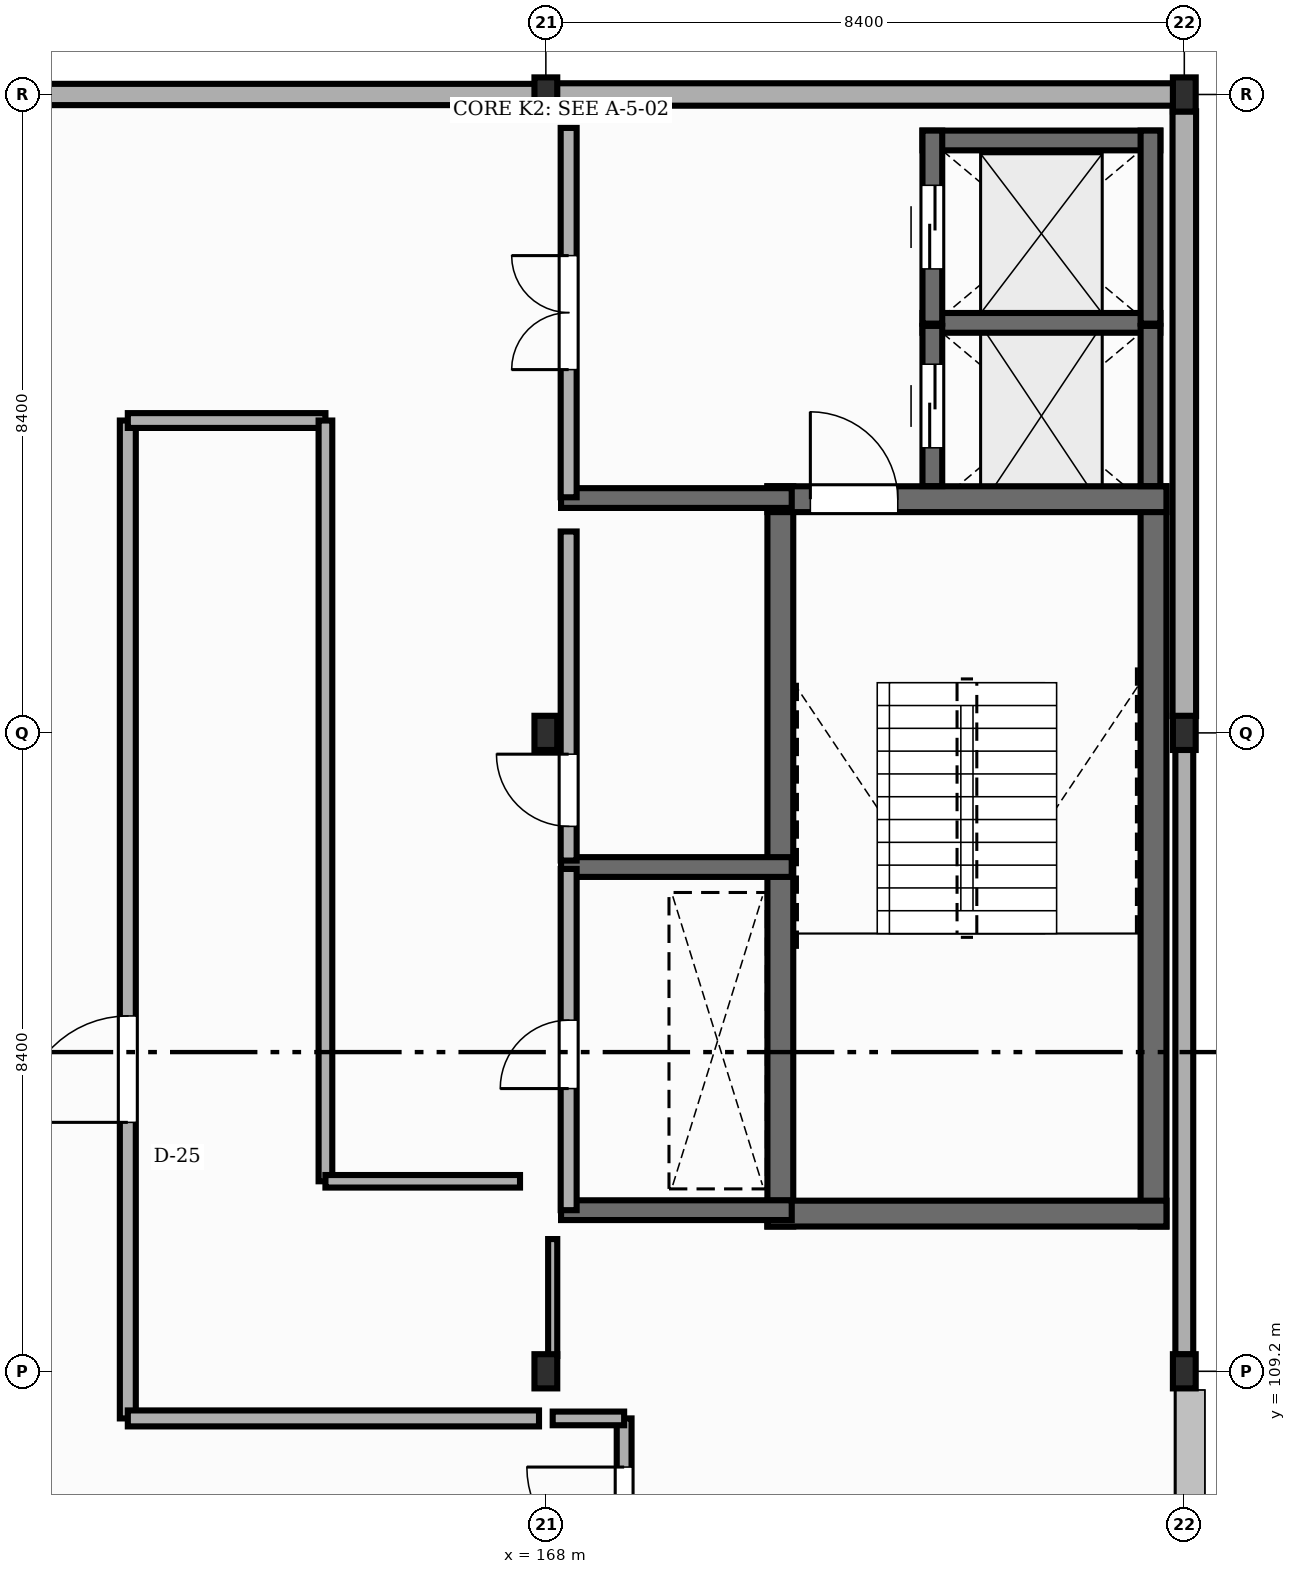
"""IFC4 building model, lengths in metres.
Left out: names, types, materials, properties, quantities, classifications, styles, units other than length and angle.
Written with IfcOpenShell. Run it as: python <this file> out.ifc"""

import sys

from ifc_helpers import new_model, si_unit, direction, frame, frame_2d, origin, origin_2d, place, context, subcontext, project, spatial, rectangle, i_section, extrude, element, fill, save


model = new_model("IFC4")
c1 = context("Model", 3, precision=1e-05, world=origin(), true_north=direction((0.0, 1.0)))
c2 = subcontext(c1, "Body", "Model", "MODEL_VIEW")
j1 = project(units=[si_unit("LENGTHUNIT", "METRE"), si_unit("PLANEANGLEUNIT", "RADIAN")], contexts=[c1])
p1 = place(None, origin())
s1 = spatial("IfcSite", under=j1, at=p1, CompositionType="ELEMENT")
p2 = place(p1, origin())
s2 = spatial("IfcBuilding", under=s1, at=p2, CompositionType="ELEMENT")
p3 = place(p2, frame((0.0, 0.0, 18.0)))
s3 = spatial("IfcBuildingStorey", under=s2, at=p3, CompositionType="ELEMENT", Elevation=18.0)
for number, where, z_axis, x_axis in (
    (1, (168.0, 109.2, 0.0), (0.0, 0.0, 1.0), (1.0, 0.0, 0.0)),
    (2, (168.0, 117.6, 0.0), (0.0, 0.0, 1.0), (1.0, 0.0, 0.0)),
    (3, (168.0, 126.0, 0.0), (0.0, 0.0, 1.0), (1.0, 0.0, 0.0)),
    (4, (176.4, 109.2, 0.0), (0.0, 0.0, 1.0), (1.0, 0.0, 0.0)),
    (5, (176.4, 117.6, 0.0), (0.0, 0.0, 1.0), (1.0, 0.0, 0.0)),
    (6, (176.4, 126.0, 0.0), (0.0, 0.0, 1.0), (1.0, 0.0, 0.0)),
):
    element("IfcColumn", number, at=place(p3, frame(where, z_axis=z_axis, x_axis=x_axis)), inside=s3, PredefinedType="COLUMN", context=c2, shape_type="SweptSolid", body=[
        extrude(i_section(OverallWidth=0.3, OverallDepth=0.45, WebThickness=0.014, FlangeThickness=0.026, FilletRadius=0.027, at=origin_2d()), origin(), (0.0, 0.0, 1.0), 4.05),
    ])
p4 = place(p3, frame((176.4, 109.421, 0.0), z_axis=(0.0, 0.0, 1.0), x_axis=(0.0, 1.0, 0.0)))
e7 = element("IfcWall", 7, at=p4, inside=s3, PredefinedType="STANDARD", context=c2, shape_type="SweptSolid", body=[
    extrude(rectangle(XDim=7.958, YDim=0.235, at=frame_2d((3.979, 0.0))), origin(), (0.0, 0.0, 1.0), 3.492),
])
p5 = place(p3, frame((176.4, 117.821, 0.0), z_axis=(0.0, 0.0, 1.0), x_axis=(0.0, 1.0, 0.0)))
e8 = element("IfcWall", 8, at=p5, inside=s3, PredefinedType="STANDARD", context=c2, shape_type="SweptSolid", body=[
    extrude(rectangle(XDim=7.958, YDim=0.31, at=frame_2d((3.979, 0.0))), origin(), (0.0, 0.0, 1.0), 3.582),
])
p6 = place(p3, frame((176.392, 126.0, 0.0), z_axis=(0.0, 0.0, 1.0), x_axis=(-1.0, 0.0, 0.0)))
e9 = element("IfcWall", 9, at=p6, inside=s3, PredefinedType="STANDARD", context=c2, shape_type="SweptSolid", body=[
    extrude(rectangle(XDim=8.384, YDim=0.295, at=frame_2d((4.192, 0.0))), origin(), (0.0, 0.0, 1.0), 3.522),
])
p7 = place(p3, frame((167.992, 126.0, 0.0), z_axis=(0.0, 0.0, 1.0), x_axis=(-1.0, 0.0, 0.0)))
e10 = element("IfcWall", 10, at=p7, inside=s3, PredefinedType="STANDARD", context=c2, shape_type="SweptSolid", body=[
    extrude(rectangle(XDim=8.384, YDim=0.28, at=frame_2d((4.192, 0.0))), origin(), (0.0, 0.0, 1.0), 3.492),
])
for number, where, z_axis, x_axis in (
    (11, (171.085, 111.105, 0.0), (0.0, 0.0, 1.0), (0.0, 1.0, 0.0)),
    (12, (175.995, 111.105, 0.0), (0.0, 0.0, 1.0), (0.0, 1.0, 0.0)),
):
    element("IfcWall", number, at=place(p3, frame(where, z_axis=z_axis, x_axis=x_axis)), inside=s3, PredefinedType="SHEAR", context=c2, shape_type="SweptSolid", body=[
        extrude(rectangle(XDim=9.74, YDim=0.34, at=frame_2d((4.87, 0.0))), origin(), (0.0, 0.0, 1.0), 3.85),
    ])
p8 = place(p3, frame((170.915, 111.275, 0.0), z_axis=(0.0, 0.0, 1.0), x_axis=(1.0, 0.0, 0.0)))
e13 = element("IfcWall", 13, at=p8, inside=s3, PredefinedType="SHEAR", context=c2, shape_type="SweptSolid", body=[
    extrude(rectangle(XDim=5.25, YDim=0.34, at=frame_2d((2.625, 0.0))), origin(), (0.0, 0.0, 1.0), 3.85),
])
p9 = place(p3, frame((170.915, 120.675, 0.0), z_axis=(0.0, 0.0, 1.0), x_axis=(1.0, 0.0, 0.0)))
e14 = element("IfcWall", 14, at=p9, inside=s3, PredefinedType="SHEAR", context=c2, shape_type="SweptSolid", body=[
    extrude(rectangle(XDim=5.25, YDim=0.34, at=frame_2d((2.625, 0.0))), origin(), (0.0, 0.0, 1.0), 3.85),
])
p10 = place(p9, frame((0.565, 0.0, 0.0)))
e15 = element("IfcOpeningElement", 15, at=p10, cuts=e14, PredefinedType="OPENING", context=c2, shape_type="SweptSolid", body=[
    extrude(rectangle(XDim=1.15, YDim=2.15, at=frame_2d((0.575, 1.075))), frame((0.0, 0.18, 0.0), z_axis=(0.0, -1.0, 0.0), x_axis=(1.0, 0.0, 0.0)), (0.0, 0.0, 1.0), 0.36),
])
p11 = place(p3, frame((172.955, 122.995, 0.0), z_axis=(0.0, 0.0, 1.0), x_axis=(1.0, 0.0, 0.0)))
e16 = element("IfcWall", 16, at=p11, inside=s3, PredefinedType="SHEAR", context=c2, shape_type="SweptSolid", body=[
    extrude(rectangle(XDim=3.13, YDim=0.26, at=frame_2d((1.565, 0.0))), origin(), (0.0, 0.0, 1.0), 3.85),
])
p12 = place(p3, frame((175.955, 120.847, 0.0), z_axis=(0.0, 0.0, 1.0), x_axis=(0.0, 1.0, 0.0)))
e17 = element("IfcWall", 17, at=p12, inside=s3, PredefinedType="SHEAR", context=c2, shape_type="SweptSolid", body=[
    extrude(rectangle(XDim=2.108, YDim=0.26, at=frame_2d((1.054, 0.0))), origin(), (0.0, 0.0, 1.0), 3.85),
])
p13 = place(p3, frame((173.085, 120.847, 0.0), z_axis=(0.0, 0.0, 1.0), x_axis=(0.0, 1.0, 0.0)))
e18 = element("IfcWall", 18, at=p13, inside=s3, PredefinedType="SHEAR", context=c2, shape_type="SweptSolid", body=[
    extrude(rectangle(XDim=2.108, YDim=0.26, at=frame_2d((1.054, 0.0))), origin(), (0.0, 0.0, 1.0), 3.85),
])
p14 = place(p13, frame((0.504, 0.0, 0.0)))
e19 = element("IfcOpeningElement", 19, at=p14, cuts=e18, PredefinedType="OPENING", context=c2, shape_type="SweptSolid", body=[
    extrude(rectangle(XDim=1.1, YDim=2.15, at=frame_2d((0.55, 1.075))), frame((0.0, 0.14, 0.0), z_axis=(0.0, -1.0, 0.0), x_axis=(1.0, 0.0, 0.0)), (0.0, 0.0, 1.0), 0.28),
])
p15 = place(p3, frame((172.955, 125.395, 0.0), z_axis=(0.0, 0.0, 1.0), x_axis=(1.0, 0.0, 0.0)))
e20 = element("IfcWall", 20, at=p15, inside=s3, PredefinedType="SHEAR", context=c2, shape_type="SweptSolid", body=[
    extrude(rectangle(XDim=3.13, YDim=0.26, at=frame_2d((1.565, 0.0))), origin(), (0.0, 0.0, 1.0), 3.85),
])
p16 = place(p3, frame((175.955, 122.985, 0.0), z_axis=(0.0, 0.0, 1.0), x_axis=(0.0, 1.0, 0.0)))
e21 = element("IfcWall", 21, at=p16, inside=s3, PredefinedType="SHEAR", context=c2, shape_type="SweptSolid", body=[
    extrude(rectangle(XDim=2.54, YDim=0.26, at=frame_2d((1.27, 0.0))), origin(), (0.0, 0.0, 1.0), 3.85),
])
p17 = place(p3, frame((173.085, 122.985, 0.0), z_axis=(0.0, 0.0, 1.0), x_axis=(0.0, 1.0, 0.0)))
e22 = element("IfcWall", 22, at=p17, inside=s3, PredefinedType="SHEAR", context=c2, shape_type="SweptSolid", body=[
    extrude(rectangle(XDim=2.54, YDim=0.26, at=frame_2d((1.27, 0.0))), origin(), (0.0, 0.0, 1.0), 3.85),
])
p18 = place(p17, frame((0.72, 0.0, 0.0)))
e23 = element("IfcOpeningElement", 23, at=p18, cuts=e22, PredefinedType="OPENING", context=c2, shape_type="SweptSolid", body=[
    extrude(rectangle(XDim=1.1, YDim=2.15, at=frame_2d((0.55, 1.075))), frame((0.0, 0.14, 0.0), z_axis=(0.0, -1.0, 0.0), x_axis=(1.0, 0.0, 0.0)), (0.0, 0.0, 1.0), 0.28),
])
for number, where, z_axis, x_axis in (
    (24, (168.2, 111.32, 0.0), (0.0, 0.0, 1.0), (1.0, 0.0, 0.0)),
    (25, (168.2, 115.835, 0.0), (0.0, 0.0, 1.0), (1.0, 0.0, 0.0)),
    (26, (168.2, 120.69, 0.0), (0.0, 0.0, 1.0), (1.0, 0.0, 0.0)),
):
    element("IfcWall", number, at=place(p3, frame(where, z_axis=z_axis, x_axis=x_axis)), inside=s3, PredefinedType="SHEAR", context=c2, shape_type="SweptSolid", body=[
        extrude(rectangle(XDim=3.035, YDim=0.26, at=frame_2d((1.518, 0.0))), origin(), (0.0, 0.0, 1.0), 3.85),
    ])
p19 = place(p3, frame((168.3, 111.32, 0.0), z_axis=(0.0, 0.0, 1.0), x_axis=(0.0, 1.0, 0.0)))
e27 = element("IfcWall", 27, at=p19, inside=s3, PredefinedType="STANDARD", context=c2, shape_type="SweptSolid", body=[
    extrude(rectangle(XDim=4.49, YDim=0.21, at=frame_2d((2.245, 0.0))), origin(), (0.0, 0.0, 1.0), 3.542),
])
p20 = place(p19, frame((1.6, 0.0, 0.0)))
e28 = element("IfcOpeningElement", 28, at=p20, cuts=e27, PredefinedType="OPENING", context=c2, shape_type="SweptSolid", body=[
    extrude(rectangle(XDim=0.9, YDim=2.1, at=frame_2d((0.45, 1.05))), frame((0.0, 0.115, 0.0), z_axis=(0.0, -1.0, 0.0), x_axis=(1.0, 0.0, 0.0)), (0.0, 0.0, 1.0), 0.23),
])
p21 = place(p3, frame((168.3, 115.92, 0.0), z_axis=(0.0, 0.0, 1.0), x_axis=(0.0, 1.0, 0.0)))
e29 = element("IfcWall", 29, at=p21, inside=s3, PredefinedType="STANDARD", context=c2, shape_type="SweptSolid", body=[
    extrude(rectangle(XDim=4.33, YDim=0.21, at=frame_2d((2.165, 0.0))), origin(), (0.0, 0.0, 1.0), 3.252),
])
p22 = place(p21, frame((0.45, 0.0, 0.0)))
e30 = element("IfcOpeningElement", 30, at=p22, cuts=e29, PredefinedType="OPENING", context=c2, shape_type="SweptSolid", body=[
    extrude(rectangle(XDim=0.95, YDim=2.15, at=frame_2d((0.475, 1.075))), frame((0.0, 0.115, 0.0), z_axis=(0.0, -1.0, 0.0), x_axis=(1.0, 0.0, 0.0)), (0.0, 0.0, 1.0), 0.23),
])
p23 = place(p3, frame((168.3, 120.7, 0.0), z_axis=(0.0, 0.0, 1.0), x_axis=(0.0, 1.0, 0.0)))
e31 = element("IfcWall", 31, at=p23, inside=s3, PredefinedType="STANDARD", context=c2, shape_type="SweptSolid", body=[
    extrude(rectangle(XDim=4.86, YDim=0.21, at=frame_2d((2.43, 0.0))), origin(), (0.0, 0.0, 1.0), 3.252),
])
p24 = place(p23, frame((1.68, 0.0, 0.0)))
e32 = element("IfcOpeningElement", 32, at=p24, cuts=e31, PredefinedType="OPENING", context=c2, shape_type="SweptSolid", body=[
    extrude(rectangle(XDim=1.5, YDim=2.2, at=frame_2d((0.75, 1.1))), frame((0.0, 0.115, 0.0), z_axis=(0.0, -1.0, 0.0), x_axis=(1.0, 0.0, 0.0)), (0.0, 0.0, 1.0), 0.23),
])
p25 = place(p3, frame((169.03, 106.3, -0.004), z_axis=(0.0, 0.0, 1.0), x_axis=(0.0, 1.0, 0.0)))
e33 = element("IfcWall", 33, at=p25, inside=s3, PredefinedType="STANDARD", context=c2, shape_type="SweptSolid", body=[
    extrude(rectangle(XDim=2.28, YDim=0.195, at=frame_2d((1.14, 0.0))), origin(), (0.0, 0.0, 1.0), 3.854),
])
p26 = place(p25, frame((0.36, 0.0, 0.0)))
e34 = element("IfcOpeningElement", 34, at=p26, cuts=e33, PredefinedType="OPENING", context=c2, shape_type="SweptSolid", body=[
    extrude(rectangle(XDim=1.28, YDim=2.22, at=frame_2d((0.64, 1.11))), frame((0.0, 0.107, 0.0), z_axis=(0.0, -1.0, 0.0), x_axis=(1.0, 0.0, 0.0)), (0.0, 0.0, 1.0), 0.215),
])
p27 = place(p3, frame((169.03, 108.58, -0.004), z_axis=(0.0, 0.0, 1.0), x_axis=(-1.0, 0.0, 0.0)))
e35 = element("IfcWall", 35, at=p27, inside=s3, PredefinedType="STANDARD", context=c2, shape_type="SweptSolid", body=[
    extrude(rectangle(XDim=0.94, YDim=0.18, at=frame_2d((0.47, 0.0))), origin(), (0.0, 0.0, 1.0), 3.854),
])
p28 = place(p3, frame((168.09, 109.402, -0.004), z_axis=(0.0, 0.0, 1.0), x_axis=(0.0, 1.0, 0.0)))
e36 = element("IfcWall", 36, at=p28, inside=s3, PredefinedType="STANDARD", context=c2, shape_type="SweptSolid", body=[
    extrude(rectangle(XDim=1.538, YDim=0.12, at=frame_2d((0.769, 0.0))), origin(), (0.0, 0.0, 1.0), 3.546),
])
p29 = place(p3, frame((162.5, 108.58, -0.004), z_axis=(0.0, 0.0, 1.0), x_axis=(0.0, 1.0, 0.0)))
e37 = element("IfcWall", 37, at=p29, inside=s3, PredefinedType="STANDARD", context=c2, shape_type="SweptSolid", body=[
    extrude(rectangle(XDim=13.13, YDim=0.21, at=frame_2d((6.565, 0.0))), origin(), (0.0, 0.0, 1.0), 3.586),
])
p30 = place(p29, frame((3.896, 0.0, 0.0)))
e38 = element("IfcOpeningElement", 38, at=p30, cuts=e37, PredefinedType="OPENING", context=c2, shape_type="SweptSolid", body=[
    extrude(rectangle(XDim=1.4, YDim=2.22, at=frame_2d((0.7, 1.11))), frame((0.0, 0.115, 0.0), z_axis=(0.0, -1.0, 0.0), x_axis=(1.0, 0.0, 0.0)), (0.0, 0.0, 1.0), 0.23),
])
p31 = place(p3, frame((162.5, 121.71, -0.004), z_axis=(0.0, 0.0, 1.0), x_axis=(1.0, 0.0, 0.0)))
e39 = element("IfcWall", 39, at=p31, inside=s3, PredefinedType="STANDARD", context=c2, shape_type="SweptSolid", body=[
    extrude(rectangle(XDim=2.6, YDim=0.195, at=frame_2d((1.3, 0.0))), origin(), (0.0, 0.0, 1.0), 3.854),
])
p32 = place(p3, frame((165.1, 121.71, -0.004), z_axis=(0.0, 0.0, 1.0), x_axis=(0.0, -1.0, 0.0)))
e40 = element("IfcWall", 40, at=p32, inside=s3, PredefinedType="STANDARD", context=c2, shape_type="SweptSolid", body=[
    extrude(rectangle(XDim=10.01, YDim=0.18, at=frame_2d((5.005, 0.0))), origin(), (0.0, 0.0, 1.0), 3.616),
])
p33 = place(p3, frame((165.1, 111.7, -0.004), z_axis=(0.0, 0.0, 1.0), x_axis=(1.0, 0.0, 0.0)))
e41 = element("IfcWall", 41, at=p33, inside=s3, PredefinedType="STANDARD", context=c2, shape_type="SweptSolid", body=[
    extrude(rectangle(XDim=2.56, YDim=0.165, at=frame_2d((1.28, 0.0))), origin(), (0.0, 0.0, 1.0), 3.854),
])
p34 = place(p3, frame((167.91, 108.58, -0.004), z_axis=(0.0, 0.0, 1.0), x_axis=(-1.0, 0.0, 0.0)))
e42 = element("IfcWall", 42, at=p34, inside=s3, PredefinedType="STANDARD", context=c2, shape_type="SweptSolid", body=[
    extrude(rectangle(XDim=5.41, YDim=0.21, at=frame_2d((2.705, 0.0))), origin(), (0.0, 0.0, 1.0), 3.854),
])
p35 = place(p10, origin())
e43 = element("IfcDoor", 43, at=p35, inside=s3, OperationType="SINGLE_SWING_LEFT", PredefinedType="DOOR", context=c2, shape_type="SweptSolid", body=[
    extrude(rectangle(XDim=1.15, YDim=2.15, at=frame_2d((0.575, 1.075))), frame((0.0, 0.025, 0.0), z_axis=(0.0, -1.0, 0.0), x_axis=(1.0, 0.0, 0.0)), (0.0, 0.0, 1.0), 0.05),
])
fill(e15, e43)
p36 = place(p14, origin())
e44 = element("IfcDoor", 44, at=p36, inside=s3, OperationType="DOUBLE_DOOR_SLIDING", PredefinedType="DOOR", context=c2, shape_type="SweptSolid", body=[
    extrude(rectangle(XDim=1.1, YDim=2.15, at=frame_2d((0.55, 1.075))), frame((0.0, 0.025, 0.0), z_axis=(0.0, -1.0, 0.0), x_axis=(1.0, 0.0, 0.0)), (0.0, 0.0, 1.0), 0.05),
])
fill(e19, e44)
p37 = place(p18, origin())
e45 = element("IfcDoor", 45, at=p37, inside=s3, OperationType="DOUBLE_DOOR_SLIDING", PredefinedType="DOOR", context=c2, shape_type="SweptSolid", body=[
    extrude(rectangle(XDim=1.1, YDim=2.15, at=frame_2d((0.55, 1.075))), frame((0.0, 0.025, 0.0), z_axis=(0.0, -1.0, 0.0), x_axis=(1.0, 0.0, 0.0)), (0.0, 0.0, 1.0), 0.05),
])
fill(e23, e45)
p38 = place(p20, origin())
e46 = element("IfcDoor", 46, at=p38, inside=s3, OperationType="SINGLE_SWING_LEFT", PredefinedType="DOOR", context=c2, shape_type="SweptSolid", body=[
    extrude(rectangle(XDim=0.9, YDim=2.1, at=frame_2d((0.45, 1.05))), frame((0.0, 0.025, 0.0), z_axis=(0.0, -1.0, 0.0), x_axis=(1.0, 0.0, 0.0)), (0.0, 0.0, 1.0), 0.05),
])
fill(e28, e46)
p39 = place(p22, origin())
e47 = element("IfcDoor", 47, at=p39, inside=s3, OperationType="SINGLE_SWING_RIGHT", PredefinedType="DOOR", context=c2, shape_type="SweptSolid", body=[
    extrude(rectangle(XDim=0.95, YDim=2.15, at=frame_2d((0.475, 1.075))), frame((0.0, 0.025, 0.0), z_axis=(0.0, -1.0, 0.0), x_axis=(1.0, 0.0, 0.0)), (0.0, 0.0, 1.0), 0.05),
])
fill(e30, e47)
p40 = place(p24, origin())
e48 = element("IfcDoor", 48, at=p40, inside=s3, OperationType="DOUBLE_DOOR_SINGLE_SWING", PredefinedType="DOOR", context=c2, shape_type="SweptSolid", body=[
    extrude(rectangle(XDim=1.5, YDim=2.2, at=frame_2d((0.75, 1.1))), frame((0.0, 0.025, 0.0), z_axis=(0.0, -1.0, 0.0), x_axis=(1.0, 0.0, 0.0)), (0.0, 0.0, 1.0), 0.05),
])
fill(e32, e48)
p41 = place(p26, origin())
e49 = element("IfcDoor", 49, at=p41, inside=s3, OperationType="SINGLE_SWING_RIGHT", PredefinedType="DOOR", context=c2, shape_type="SweptSolid", body=[
    extrude(rectangle(XDim=1.28, YDim=2.22, at=frame_2d((0.64, 1.11))), frame((0.0, 0.025, 0.0), z_axis=(0.0, -1.0, 0.0), x_axis=(1.0, 0.0, 0.0)), (0.0, 0.0, 1.0), 0.05),
])
fill(e34, e49)
p42 = place(p30, origin())
e50 = element("IfcDoor", 50, at=p42, inside=s3, OperationType="SINGLE_SWING_LEFT", PredefinedType="DOOR", context=c2, shape_type="SweptSolid", body=[
    extrude(rectangle(XDim=1.4, YDim=2.22, at=frame_2d((0.7, 1.11))), frame((0.0, 0.025, 0.0), z_axis=(0.0, -1.0, 0.0), x_axis=(1.0, 0.0, 0.0)), (0.0, 0.0, 1.0), 0.05),
])
fill(e38, e50)
save(model, sys.argv[1])
